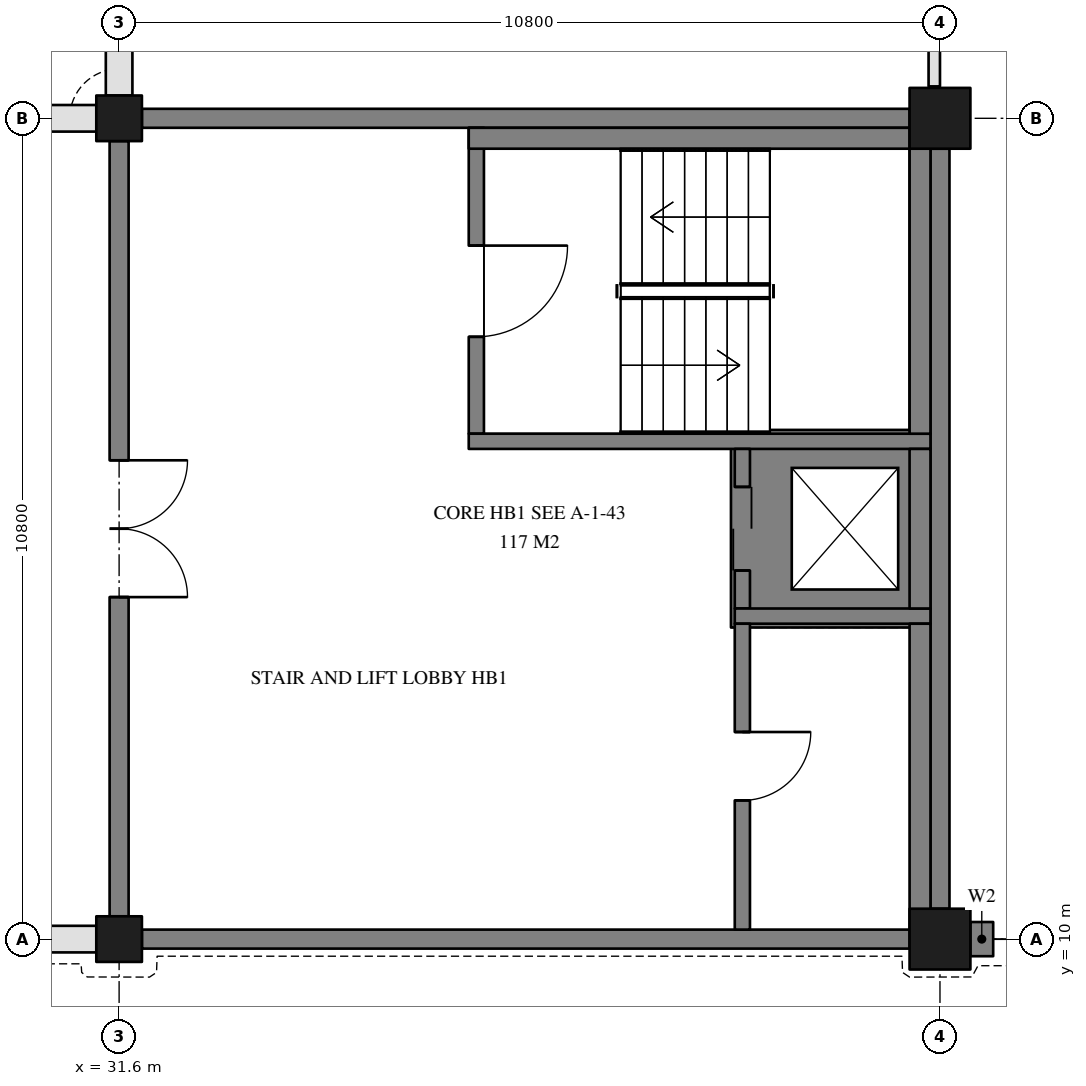
"""IFC4 building model, lengths in metres.
Left out: names, types, materials, properties, quantities, classifications, styles, units other than length and angle.
Written with IfcOpenShell. Run it as: python <this file> out.ifc"""

import sys

from ifc_helpers import new_model, si_unit, direction, frame, frame_2d, origin, origin_2d, place, context, subcontext, project, spatial, polyline, rectangle, outline, extrude, element, fill, save


model = new_model("IFC4")
c1 = context("Model", 3, precision=1e-05, world=origin(), true_north=direction((0.0, 1.0)))
c2 = subcontext(c1, "Body", "Model", "MODEL_VIEW")
j1 = project(units=[si_unit("LENGTHUNIT", "METRE"), si_unit("PLANEANGLEUNIT", "RADIAN")], contexts=[c1])
p1 = place(None, origin())
s1 = spatial("IfcSite", under=j1, at=p1, CompositionType="ELEMENT")
p2 = place(p1, origin())
s2 = spatial("IfcBuilding", under=s1, at=p2, CompositionType="ELEMENT")
p3 = place(p2, frame((0.0, 0.0, -5.4)))
s3 = spatial("IfcBuildingStorey", under=s2, at=p3, CompositionType="ELEMENT", Elevation=-5.4)
for number, where, z_axis, x_axis in (
    (1, (42.4, 10.0, -0.4), (0.0, 0.0, 1.0), (1.0, 0.0, 0.0)),
    (2, (42.4, 20.8, -0.4), (0.0, 0.0, 1.0), (1.0, 0.0, 0.0)),
):
    element("IfcColumn", number, at=place(p3, frame(where, z_axis=z_axis, x_axis=x_axis)), inside=s3, PredefinedType="COLUMN", context=c2, shape_type="SweptSolid", body=[
        extrude(rectangle(XDim=0.8, YDim=0.8, at=origin_2d()), origin(), (0.0, 0.0, 1.0), 5.8),
    ])
for number, where, z_axis, x_axis in (
    (3, (31.6, 10.0, -0.4), (0.0, 0.0, 1.0), (1.0, 0.0, 0.0)),
    (4, (31.6, 20.8, -0.4), (0.0, 0.0, 1.0), (1.0, 0.0, 0.0)),
):
    element("IfcColumn", number, at=place(p3, frame(where, z_axis=z_axis, x_axis=x_axis)), inside=s3, PredefinedType="COLUMN", context=c2, shape_type="SweptSolid", body=[
        extrude(rectangle(XDim=0.6, YDim=0.6, at=origin_2d()), origin(), (0.0, 0.0, 1.0), 5.8),
    ])
p4 = place(p3, frame((0.0, 0.0, -1.4)))
e5 = element("IfcWall", 5, at=p4, inside=s3, PredefinedType="SOLIDWALL", context=c2, shape_type="SweptSolid", body=[
    extrude(outline(polyline([(39.65, 16.7), (39.65, 14.1), (42.25, 14.1), (42.25, 16.7), (39.65, 16.7)]), holes=[polyline([(39.9, 14.35), (42.0, 14.35), (42.0, 16.45), (39.9, 16.45), (39.9, 14.35)])]), origin(), (0.0, 0.0, 1.0), 1.4),
])
p5 = place(p3, frame((31.9, 10.0, 0.0), z_axis=(0.0, 0.0, 1.0), x_axis=(1.0, 0.0, 0.0)))
e6 = element("IfcWall", 6, at=p5, inside=s3, PredefinedType="SOLIDWALL", context=c2, shape_type="SweptSolid", body=[
    extrude(rectangle(XDim=10.1, YDim=0.25, at=frame_2d((5.05, 0.0))), origin(), (0.0, 0.0, 1.0), 5.4),
])
p6 = place(p3, frame((42.4, 10.4, 0.0), z_axis=(0.0, 0.0, 1.0), x_axis=(0.0, 1.0, 0.0)))
e7 = element("IfcWall", 7, at=p6, inside=s3, PredefinedType="SOLIDWALL", context=c2, shape_type="SweptSolid", body=[
    extrude(rectangle(XDim=10.0, YDim=0.25, at=frame_2d((5.0, 0.0))), origin(), (0.0, 0.0, 1.0), 5.4),
])
p7 = place(p3, frame((42.0, 20.8, 0.0), z_axis=(0.0, 0.0, 1.0), x_axis=(-1.0, 0.0, 0.0)))
e8 = element("IfcWall", 8, at=p7, inside=s3, PredefinedType="SOLIDWALL", context=c2, shape_type="SweptSolid", body=[
    extrude(rectangle(XDim=10.1, YDim=0.25, at=frame_2d((5.05, 0.0))), origin(), (0.0, 0.0, 1.0), 5.4),
])
p8 = place(p3, frame((31.6, 20.5, 0.0), z_axis=(0.0, 0.0, 1.0), x_axis=(0.0, -1.0, 0.0)))
e9 = element("IfcWall", 9, at=p8, inside=s3, PredefinedType="SOLIDWALL", context=c2, shape_type="SweptSolid", body=[
    extrude(rectangle(XDim=10.2, YDim=0.25, at=frame_2d((5.1, 0.0))), origin(), (0.0, 0.0, 1.0), 5.4),
])
p9 = place(p8, frame((4.2, 0.0, 0.0)))
e10 = element("IfcOpeningElement", 10, at=p9, cuts=e9, PredefinedType="OPENING", context=c2, shape_type="SweptSolid", body=[
    extrude(rectangle(XDim=1.8, YDim=2.1, at=frame_2d((0.9, 1.05))), frame((0.0, 0.135, 0.0), z_axis=(0.0, -1.0, 0.0), x_axis=(1.0, 0.0, 0.0)), (0.0, 0.0, 1.0), 0.27),
])
p10 = place(p3, frame((21.1, 10.0, 0.0), z_axis=(0.0, 0.0, 1.0), x_axis=(1.0, 0.0, 0.0)))
e11 = element("IfcWall", 11, at=p10, inside=s3, PredefinedType="SOLIDWALL", context=c2, shape_type="SweptSolid", body=[
    extrude(rectangle(XDim=10.2, YDim=0.35, at=frame_2d((5.1, 0.0))), origin(), (0.0, 0.0, 1.0), 3.9),
])
p11 = place(p10, frame((1.05, 0.0, 1.5)))
e12 = element("IfcOpeningElement", 12, at=p11, cuts=e11, PredefinedType="OPENING", context=c2, shape_type="SweptSolid", body=[
    extrude(rectangle(XDim=0.9, YDim=1.2, at=frame_2d((0.45, 0.6))), frame((0.0, 0.185, 0.0), z_axis=(0.0, -1.0, 0.0), x_axis=(1.0, 0.0, 0.0)), (0.0, 0.0, 1.0), 0.37),
])
p12 = place(p10, frame((3.75, 0.0, 0.0)))
e13 = element("IfcOpeningElement", 13, at=p12, cuts=e11, PredefinedType="OPENING", context=c2, shape_type="SweptSolid", body=[
    extrude(rectangle(XDim=2.7, YDim=2.4, at=frame_2d((1.35, 1.2))), frame((0.0, 0.185, 0.0), z_axis=(0.0, -1.0, 0.0), x_axis=(1.0, 0.0, 0.0)), (0.0, 0.0, 1.0), 0.37),
])
p13 = place(p10, frame((8.25, 0.0, 1.5)))
e14 = element("IfcOpeningElement", 14, at=p13, cuts=e11, PredefinedType="OPENING", context=c2, shape_type="SweptSolid", body=[
    extrude(rectangle(XDim=0.9, YDim=1.2, at=frame_2d((0.45, 0.6))), frame((0.0, 0.185, 0.0), z_axis=(0.0, -1.0, 0.0), x_axis=(1.0, 0.0, 0.0)), (0.0, 0.0, 1.0), 0.37),
])
p14 = place(p3, frame((21.1, 20.8, 0.0), z_axis=(0.0, 0.0, 1.0), x_axis=(1.0, 0.0, 0.0)))
e15 = element("IfcWall", 15, at=p14, inside=s3, PredefinedType="SOLIDWALL", context=c2, shape_type="SweptSolid", body=[
    extrude(rectangle(XDim=10.2, YDim=0.35, at=frame_2d((5.1, 0.0))), origin(), (0.0, 0.0, 1.0), 3.6),
])
p15 = place(p14, frame((0.9, 0.0, 0.9)))
e16 = element("IfcOpeningElement", 16, at=p15, cuts=e15, PredefinedType="OPENING", context=c2, shape_type="SweptSolid", body=[
    extrude(rectangle(XDim=1.2, YDim=1.5, at=frame_2d((0.6, 0.75))), frame((0.0, 0.185, 0.0), z_axis=(0.0, -1.0, 0.0), x_axis=(1.0, 0.0, 0.0)), (0.0, 0.0, 1.0), 0.37),
])
p16 = place(p14, frame((4.2, 0.0, 0.0)))
e17 = element("IfcOpeningElement", 17, at=p16, cuts=e15, PredefinedType="OPENING", context=c2, shape_type="SweptSolid", body=[
    extrude(rectangle(XDim=1.8, YDim=2.4, at=frame_2d((0.9, 1.2))), frame((0.0, 0.185, 0.0), z_axis=(0.0, -1.0, 0.0), x_axis=(1.0, 0.0, 0.0)), (0.0, 0.0, 1.0), 0.37),
])
p17 = place(p14, frame((8.1, 0.0, 0.9)))
e18 = element("IfcOpeningElement", 18, at=p17, cuts=e15, PredefinedType="OPENING", context=c2, shape_type="SweptSolid", body=[
    extrude(rectangle(XDim=1.2, YDim=1.5, at=frame_2d((0.6, 0.75))), frame((0.0, 0.185, 0.0), z_axis=(0.0, -1.0, 0.0), x_axis=(1.0, 0.0, 0.0)), (0.0, 0.0, 1.0), 0.37),
])
p18 = place(p3, frame((31.6, 21.1, 0.0), z_axis=(0.0, 0.0, 1.0), x_axis=(0.0, 1.0, 0.0)))
e19 = element("IfcWall", 19, at=p18, inside=s3, PredefinedType="SOLIDWALL", context=c2, shape_type="SweptSolid", body=[
    extrude(rectangle(XDim=10.2, YDim=0.35, at=frame_2d((5.1, 0.0))), origin(), (0.0, 0.0, 1.0), 3.6),
])
p19 = place(p18, frame((0.9, 0.0, 0.9)))
e20 = element("IfcOpeningElement", 20, at=p19, cuts=e19, PredefinedType="OPENING", context=c2, shape_type="SweptSolid", body=[
    extrude(rectangle(XDim=1.2, YDim=1.5, at=frame_2d((0.6, 0.75))), frame((0.0, 0.185, 0.0), z_axis=(0.0, -1.0, 0.0), x_axis=(1.0, 0.0, 0.0)), (0.0, 0.0, 1.0), 0.37),
])
p20 = place(p18, frame((4.2, 0.0, 0.0)))
e21 = element("IfcOpeningElement", 21, at=p20, cuts=e19, PredefinedType="OPENING", context=c2, shape_type="SweptSolid", body=[
    extrude(rectangle(XDim=1.8, YDim=2.4, at=frame_2d((0.9, 1.2))), frame((0.0, 0.185, 0.0), z_axis=(0.0, -1.0, 0.0), x_axis=(1.0, 0.0, 0.0)), (0.0, 0.0, 1.0), 0.37),
])
p21 = place(p18, frame((8.1, 0.0, 0.9)))
e22 = element("IfcOpeningElement", 22, at=p21, cuts=e19, PredefinedType="OPENING", context=c2, shape_type="SweptSolid", body=[
    extrude(rectangle(XDim=1.2, YDim=1.5, at=frame_2d((0.6, 0.75))), frame((0.0, 0.185, 0.0), z_axis=(0.0, -1.0, 0.0), x_axis=(1.0, 0.0, 0.0)), (0.0, 0.0, 1.0), 0.37),
])
p22 = place(p3, frame((42.8, 10.0, 0.0), z_axis=(0.0, 0.0, 1.0), x_axis=(1.0, 0.0, 0.0)))
e23 = element("IfcWall", 23, at=p22, inside=s3, PredefinedType="SOLIDWALL", context=c2, shape_type="SweptSolid", body=[
    extrude(rectangle(XDim=0.3, YDim=0.45, at=frame_2d((0.15, 0.0))), origin(), (0.0, 0.0, 1.0), 3.8),
])
p23 = place(p3, frame((36.3, 20.675, 0.0), z_axis=(0.0, 0.0, 1.0), x_axis=(0.0, -1.0, 0.0)))
e24 = element("IfcWall", 24, at=p23, inside=s3, PredefinedType="SOLIDWALL", context=c2, shape_type="SweptSolid", body=[
    extrude(rectangle(XDim=4.025, YDim=0.2, at=frame_2d((2.013, 0.0))), origin(), (0.0, 0.0, 1.0), 4.8),
])
p24 = place(p23, frame((1.55, 0.0, 0.0)))
e25 = element("IfcOpeningElement", 25, at=p24, cuts=e24, PredefinedType="OPENING", context=c2, shape_type="SweptSolid", body=[
    extrude(rectangle(XDim=1.2, YDim=2.1, at=frame_2d((0.6, 1.05))), frame((0.0, 0.11, 0.0), z_axis=(0.0, -1.0, 0.0), x_axis=(1.0, 0.0, 0.0)), (0.0, 0.0, 1.0), 0.22),
])
p25 = place(p3, frame((36.2, 16.55, 0.0), z_axis=(0.0, 0.0, 1.0), x_axis=(1.0, 0.0, 0.0)))
e26 = element("IfcWall", 26, at=p25, inside=s3, PredefinedType="SOLIDWALL", context=c2, shape_type="SweptSolid", body=[
    extrude(rectangle(XDim=6.075, YDim=0.2, at=frame_2d((3.038, 0.0))), origin(), (0.0, 0.0, 1.0), 4.8),
])
p26 = place(p3, frame((39.8, 16.45, 0.0), z_axis=(0.0, 0.0, 1.0), x_axis=(0.0, -1.0, 0.0)))
e27 = element("IfcWall", 27, at=p26, inside=s3, PredefinedType="SOLIDWALL", context=c2, shape_type="SweptSolid", body=[
    extrude(rectangle(XDim=2.1, YDim=0.2, at=frame_2d((1.05, 0.0))), origin(), (0.0, 0.0, 1.0), 4.8),
])
p27 = place(p26, frame((0.5, 0.0, 0.0)))
e28 = element("IfcOpeningElement", 28, at=p27, cuts=e27, PredefinedType="OPENING", context=c2, shape_type="SweptSolid", body=[
    extrude(rectangle(XDim=1.1, YDim=2.1, at=frame_2d((0.55, 1.05))), frame((0.0, 0.11, 0.0), z_axis=(0.0, -1.0, 0.0), x_axis=(1.0, 0.0, 0.0)), (0.0, 0.0, 1.0), 0.22),
])
p28 = place(p3, frame((39.7, 14.25, 0.0), z_axis=(0.0, 0.0, 1.0), x_axis=(1.0, 0.0, 0.0)))
e29 = element("IfcWall", 29, at=p28, inside=s3, PredefinedType="SOLIDWALL", context=c2, shape_type="SweptSolid", body=[
    extrude(rectangle(XDim=2.575, YDim=0.2, at=frame_2d((1.288, 0.0))), origin(), (0.0, 0.0, 1.0), 4.8),
])
p29 = place(p3, frame((39.8, 14.15, 0.0), z_axis=(0.0, 0.0, 1.0), x_axis=(0.0, -1.0, 0.0)))
e30 = element("IfcWall", 30, at=p29, inside=s3, PredefinedType="SOLIDWALL", context=c2, shape_type="SweptSolid", body=[
    extrude(rectangle(XDim=4.025, YDim=0.2, at=frame_2d((2.012, 0.0))), origin(), (0.0, 0.0, 1.0), 4.8),
])
p30 = place(p29, frame((1.425, 0.0, 0.0)))
e31 = element("IfcOpeningElement", 31, at=p30, cuts=e30, PredefinedType="OPENING", context=c2, shape_type="SweptSolid", body=[
    extrude(rectangle(XDim=0.9, YDim=2.1, at=frame_2d((0.45, 1.05))), frame((0.0, 0.11, 0.0), z_axis=(0.0, -1.0, 0.0), x_axis=(1.0, 0.0, 0.0)), (0.0, 0.0, 1.0), 0.22),
])
p31 = place(p3, frame((36.2, 20.538, 0.0), z_axis=(0.0, 0.0, 1.0), x_axis=(1.0, 0.0, 0.0)))
e32 = element("IfcWall", 32, at=p31, inside=s3, PredefinedType="SOLIDWALL", context=c2, shape_type="SweptSolid", body=[
    extrude(rectangle(XDim=6.075, YDim=0.275, at=frame_2d((3.038, 0.0))), origin(), (0.0, 0.0, 1.0), 4.8),
])
p32 = place(p3, frame((42.137, 20.675, 0.0), z_axis=(0.0, 0.0, 1.0), x_axis=(0.0, -1.0, 0.0)))
e33 = element("IfcWall", 33, at=p32, inside=s3, PredefinedType="SOLIDWALL", context=c2, shape_type="SweptSolid", body=[
    extrude(rectangle(XDim=4.025, YDim=0.275, at=frame_2d((2.013, 0.0))), origin(), (0.0, 0.0, 1.0), 4.8),
])
p33 = place(p3, frame((42.137, 16.45, 0.0), z_axis=(0.0, 0.0, 1.0), x_axis=(0.0, -1.0, 0.0)))
e34 = element("IfcWall", 34, at=p33, inside=s3, PredefinedType="SOLIDWALL", context=c2, shape_type="SweptSolid", body=[
    extrude(rectangle(XDim=2.1, YDim=0.275, at=frame_2d((1.05, 0.0))), origin(), (0.0, 0.0, 1.0), 4.8),
])
p34 = place(p3, frame((42.137, 14.15, 0.0), z_axis=(0.0, 0.0, 1.0), x_axis=(0.0, -1.0, 0.0)))
e35 = element("IfcWall", 35, at=p34, inside=s3, PredefinedType="SOLIDWALL", context=c2, shape_type="SweptSolid", body=[
    extrude(rectangle(XDim=4.025, YDim=0.275, at=frame_2d((2.012, 0.0))), origin(), (0.0, 0.0, 1.0), 4.8),
])
p35 = place(p3, frame((42.325, 21.22, 0.0), z_axis=(0.0, 0.0, 1.0), x_axis=(0.0, 1.0, 0.0)))
e36 = element("IfcWall", 36, at=p35, inside=s3, PredefinedType="PARTITIONING", context=c2, shape_type="SweptSolid", body=[
    extrude(rectangle(XDim=3.18, YDim=0.15, at=frame_2d((1.59, 0.0))), origin(), (0.0, 0.0, 1.0), 3.9),
])
p36 = place(p27, frame((1.1, 0.0, 0.0), z_axis=(0.0, 0.0, 1.0), x_axis=(-1.0, 0.0, 0.0)))
e37 = element("IfcDoor", 37, at=p36, inside=s3, OperationType="DOUBLE_DOOR_SLIDING", PredefinedType="DOOR", context=c2, shape_type="SweptSolid", body=[
    extrude(rectangle(XDim=1.1, YDim=2.1, at=frame_2d((0.55, 1.05))), frame((0.0, 0.025, 0.0), z_axis=(0.0, -1.0, 0.0), x_axis=(1.0, 0.0, 0.0)), (0.0, 0.0, 1.0), 0.05),
])
fill(e28, e37)
p37 = place(p24, frame((1.2, 0.0, 0.0), z_axis=(0.0, 0.0, 1.0), x_axis=(-1.0, 0.0, 0.0)))
e38 = element("IfcDoor", 38, at=p37, inside=s3, OperationType="SINGLE_SWING_LEFT", PredefinedType="DOOR", context=c2, shape_type="SweptSolid", body=[
    extrude(rectangle(XDim=1.2, YDim=2.1, at=frame_2d((0.6, 1.05))), frame((0.0, 0.025, 0.0), z_axis=(0.0, -1.0, 0.0), x_axis=(1.0, 0.0, 0.0)), (0.0, 0.0, 1.0), 0.05),
])
fill(e25, e38)
p38 = place(p30, frame((0.9, 0.0, 0.0), z_axis=(0.0, 0.0, 1.0), x_axis=(-1.0, 0.0, 0.0)))
e39 = element("IfcDoor", 39, at=p38, inside=s3, OperationType="SINGLE_SWING_RIGHT", PredefinedType="DOOR", context=c2, shape_type="SweptSolid", body=[
    extrude(rectangle(XDim=0.9, YDim=2.1, at=frame_2d((0.45, 1.05))), frame((0.0, 0.025, 0.0), z_axis=(0.0, -1.0, 0.0), x_axis=(1.0, 0.0, 0.0)), (0.0, 0.0, 1.0), 0.05),
])
fill(e31, e39)
p39 = place(p9, frame((1.8, 0.0, 0.0), z_axis=(0.0, 0.0, 1.0), x_axis=(-1.0, 0.0, 0.0)))
e40 = element("IfcDoor", 40, at=p39, inside=s3, OperationType="DOUBLE_DOOR_DOUBLE_SWING", PredefinedType="DOOR", context=c2, shape_type="SweptSolid", body=[
    extrude(rectangle(XDim=1.8, YDim=2.1, at=frame_2d((0.9, 1.05))), frame((0.0, 0.025, 0.0), z_axis=(0.0, -1.0, 0.0), x_axis=(1.0, 0.0, 0.0)), (0.0, 0.0, 1.0), 0.05),
])
fill(e10, e40)
save(model, sys.argv[1])
